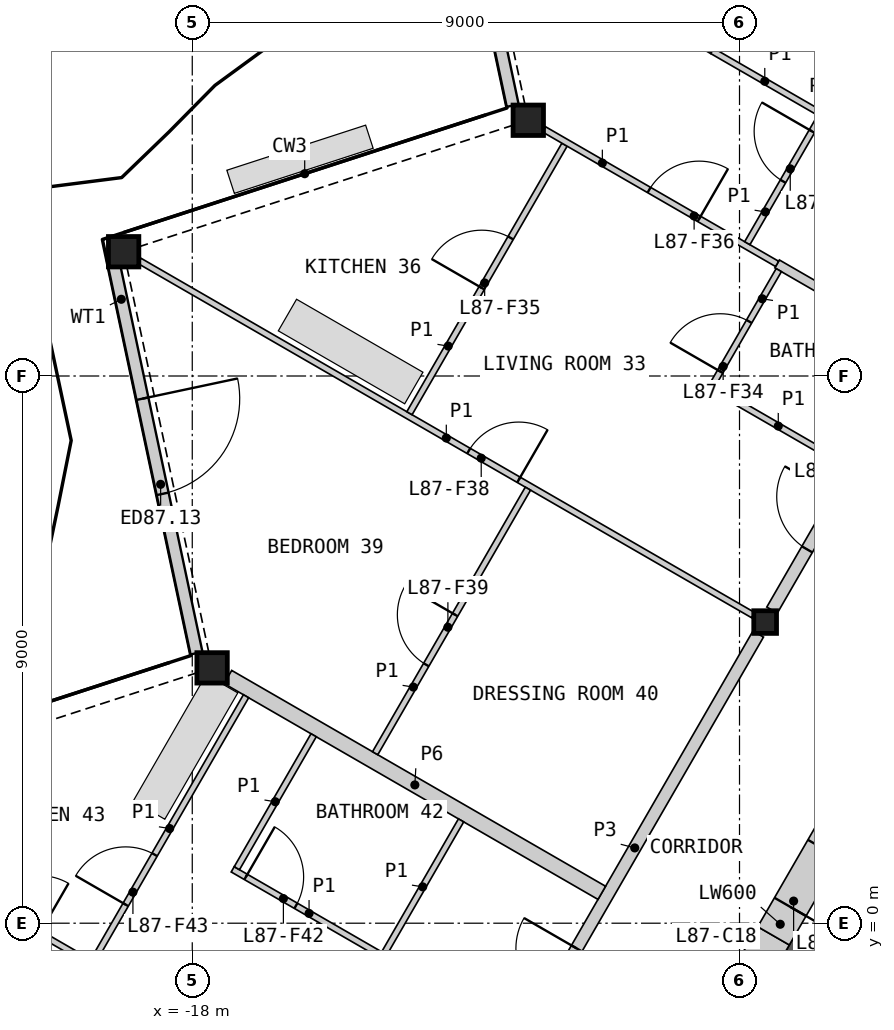
"""IFC4 building model, lengths in metres.
Left out: names, types, materials, properties, quantities, classifications, styles, units other than length and angle.
Written with IfcOpenShell. Run it as: python <this file> out.ifc"""

import sys

from ifc_helpers import new_model, si_unit, direction, frame, frame_2d, origin, origin_2d, place, context, subcontext, project, spatial, polyline, rectangle, hollow_rectangle, i_section, outline, extrude, element, fill, save


model = new_model("IFC4")
c1 = context("Model", 3, precision=1e-05, world=origin(), true_north=direction((0.0, 1.0)))
c2 = subcontext(c1, "Body", "Model", "MODEL_VIEW")
j1 = project(units=[si_unit("LENGTHUNIT", "METRE"), si_unit("PLANEANGLEUNIT", "RADIAN")], contexts=[c1])
p1 = place(None, origin())
s1 = spatial("IfcSite", under=j1, at=p1, CompositionType="ELEMENT")
p2 = place(p1, origin())
s2 = spatial("IfcBuilding", under=s1, at=p2, CompositionType="ELEMENT")
p3 = place(p2, frame((0.0, 0.0, 384.8)))
s3 = spatial("IfcBuildingStorey", under=s2, at=p3, CompositionType="ELEMENT", Elevation=384.8)
for number, where, z_axis, x_axis in (
    (1, (-12.474, 13.206, 0.0), (0.0, 0.0, 1.0), (1.0, 0.0, 0.0)),
    (2, (-19.129, 11.044, 0.0), (0.0, 0.0, 1.0), (1.0, 0.0, 0.0)),
    (3, (-17.674, 4.199, 0.0), (0.0, 0.0, 1.0), (1.0, 0.0, 0.0)),
):
    element("IfcColumn", number, at=place(p3, frame(where, z_axis=z_axis, x_axis=x_axis)), inside=s3, PredefinedType="COLUMN", context=c2, shape_type="SweptSolid", body=[
        extrude(hollow_rectangle(XDim=0.5, YDim=0.5, WallThickness=0.03, at=origin_2d()), origin(), (0.0, 0.0, 1.0), 3.4),
    ])
p4 = place(p3, frame((-8.578, 4.953, 0.0), z_axis=(0.0, 0.0, 1.0), x_axis=(1.0, 0.0, 0.0)))
e4 = element("IfcColumn", 4, at=p4, inside=s3, PredefinedType="COLUMN", context=c2, shape_type="SweptSolid", body=[
    extrude(i_section(OverallWidth=0.374, OverallDepth=0.372, WebThickness=0.016, FlangeThickness=0.026, at=origin_2d()), origin(), (0.0, 0.0, 1.0), 3.4),
])
p5 = place(p3, frame((-14.104, 19.915, 0.0), z_axis=(0.0, 0.0, 1.0), x_axis=(0.207924998532, -0.978144771997, 0.0)))
e5 = element("IfcWall", 5, at=p5, inside=s3, PredefinedType="SOLIDWALL", context=c2, shape_type="SweptSolid", body=[
    extrude(rectangle(XDim=6.612, YDim=0.2, at=frame_2d((3.306, 0.0))), origin(), (0.0, 0.0, 1.0), 2.634),
])
p6 = place(p5, frame((2.333, 0.0, 0.0)))
e6 = element("IfcOpeningElement", 6, at=p6, cuts=e5, PredefinedType="OPENING", context=c2, shape_type="SweptSolid", body=[
    extrude(rectangle(XDim=1.6, YDim=2.25, at=frame_2d((0.8, 1.125))), frame((0.0, 0.11, 0.0), z_axis=(0.0, -1.0, 0.0), x_axis=(1.0, 0.0, 0.0)), (0.0, 0.0, 1.0), 0.22),
])
p7 = place(p3, frame((-19.304, 10.909, 0.0), z_axis=(0.0, 0.0, 1.0), x_axis=(0.207882161022, -0.97815387702, 0.0)))
e7 = element("IfcWall", 7, at=p7, inside=s3, PredefinedType="SOLIDWALL", context=c2, shape_type="SweptSolid", body=[
    extrude(rectangle(XDim=6.612, YDim=0.2, at=frame_2d((3.306, 0.0))), origin(), (0.0, 0.0, 1.0), 2.634),
])
p8 = place(p7, frame((2.333, 0.0, 0.0)))
e8 = element("IfcOpeningElement", 8, at=p8, cuts=e7, PredefinedType="OPENING", context=c2, shape_type="SweptSolid", body=[
    extrude(rectangle(XDim=1.6, YDim=2.25, at=frame_2d((0.8, 1.125))), frame((0.0, 0.11, 0.0), z_axis=(0.0, -1.0, 0.0), x_axis=(1.0, 0.0, 0.0)), (0.0, 0.0, 1.0), 0.22),
])
p9 = place(p3, origin())
e9 = element("IfcWall", 9, at=p9, inside=s3, PredefinedType="SHEAR", context=c2, shape_type="SweptSolid", body=[
    extrude(outline(polyline([(-6.061, -1.697), (-8.231, -0.444), (-8.131, -0.271), (-5.96, -1.524), (-6.061, -1.697)])), origin(), (0.0, 0.0, 1.0), 3.1),
])
p10 = place(p3, frame((-8.44, -0.208, 0.0), z_axis=(0.0, 0.0, 1.0), x_axis=(-0.500001951578, -0.866024277037, 0.0)))
e10 = element("IfcWall", 10, at=p10, inside=s3, PredefinedType="SHEAR", context=c2, shape_type="SweptSolid", body=[
    extrude(rectangle(XDim=2.243, YDim=0.6, at=frame_2d((1.122, 0.0))), origin(), (0.0, 0.0, 1.0), 3.1),
])
p11 = place(p10, frame((0.7, 0.0, 0.0)))
e11 = element("IfcOpeningElement", 11, at=p11, cuts=e10, PredefinedType="OPENING", context=c2, shape_type="SweptSolid", body=[
    extrude(rectangle(XDim=1.0, YDim=2.1, at=frame_2d((0.5, 1.05))), frame((0.0, 0.31, 0.0), z_axis=(0.0, -1.0, 0.0), x_axis=(1.0, 0.0, 0.0)), (0.0, 0.0, 1.0), 0.62),
])
p12 = place(p3, frame((-7.34, 1.698, 0.0), z_axis=(0.0, 0.0, 1.0), x_axis=(-0.50002983664, -0.866008176907, 0.0)))
e12 = element("IfcWall", 12, at=p12, inside=s3, PredefinedType="SHEAR", context=c2, shape_type="SweptSolid", body=[
    extrude(rectangle(XDim=2.2, YDim=0.6, at=frame_2d((1.1, 0.0))), origin(), (0.0, 0.0, 1.0), 3.1),
])
p13 = place(p12, frame((0.55, 0.0, 0.0)))
e13 = element("IfcOpeningElement", 13, at=p13, cuts=e12, PredefinedType="OPENING", context=c2, shape_type="SweptSolid", body=[
    extrude(rectangle(XDim=1.1, YDim=2.1, at=frame_2d((0.55, 1.05))), frame((0.0, 0.31, 0.0), z_axis=(0.0, -1.0, 0.0), x_axis=(1.0, 0.0, 0.0)), (0.0, 0.0, 1.0), 0.62),
])
p14 = place(p3, frame((-8.465, 5.15, 0.0), z_axis=(0.0, 0.0, 1.0), x_axis=(0.499992155518, 0.866029932751, 0.0)))
e14 = element("IfcWall", 14, at=p14, inside=s3, PredefinedType="PARTITIONING", context=c2, shape_type="SweptSolid", body=[
    extrude(rectangle(XDim=8.123, YDim=0.2, at=frame_2d((4.062, 0.0))), origin(), (0.0, 0.0, 1.0), 3.1),
])
p15 = place(p14, frame((1.153, 0.0, 0.0)))
e15 = element("IfcOpeningElement", 15, at=p15, cuts=e14, PredefinedType="OPENING", context=c2, shape_type="SweptSolid", body=[
    extrude(rectangle(XDim=1.0, YDim=2.1, at=frame_2d((0.5, 1.05))), frame((0.0, 0.11, 0.0), z_axis=(0.0, -1.0, 0.0), x_axis=(1.0, 0.0, 0.0)), (0.0, 0.0, 1.0), 0.22),
])
p16 = place(p3, frame((-12.754, -2.279, 0.0), z_axis=(0.0, 0.0, 1.0), x_axis=(0.500001682468, 0.866024432409, 0.0)))
e16 = element("IfcWall", 16, at=p16, inside=s3, PredefinedType="PARTITIONING", context=c2, shape_type="SweptSolid", body=[
    extrude(rectangle(XDim=8.124, YDim=0.2, at=frame_2d((4.062, 0.0))), origin(), (0.0, 0.0, 1.0), 3.1),
])
p17 = place(p16, frame((1.153, 0.0, 0.0)))
e17 = element("IfcOpeningElement", 17, at=p17, cuts=e16, PredefinedType="OPENING", context=c2, shape_type="SweptSolid", body=[
    extrude(rectangle(XDim=1.0, YDim=2.1, at=frame_2d((0.5, 1.05))), frame((0.0, 0.11, 0.0), z_axis=(0.0, -1.0, 0.0), x_axis=(1.0, 0.0, 0.0)), (0.0, 0.0, 1.0), 0.22),
])
p18 = place(p3, frame((-17.414, 4.049, 0.0), z_axis=(0.0, 0.0, 1.0), x_axis=(0.866033839264, -0.499985389037, 0.0)))
e18 = element("IfcWall", 18, at=p18, inside=s3, PredefinedType="PARTITIONING", context=c2, shape_type="SweptSolid", body=[
    extrude(rectangle(XDim=7.1, YDim=0.25, at=frame_2d((3.55, 0.0))), origin(), (0.0, 0.0, 1.0), 2.33),
])
p19 = place(p3, frame((-8.382, 10.844, 0.0), z_axis=(0.0, 0.0, 1.0), x_axis=(0.866021425885, -0.500006889861, 0.0)))
e19 = element("IfcWall", 19, at=p19, inside=s3, PredefinedType="PLUMBINGWALL", context=c2, shape_type="SweptSolid", body=[
    extrude(rectangle(XDim=2.675, YDim=0.15, at=frame_2d((1.337, 0.0))), origin(), (0.0, 0.0, 1.0), 2.33),
])
p20 = place(p3, frame((-24.069, 1.887, 0.0), z_axis=(0.0, 0.0, 1.0), x_axis=(0.866023404247, -0.500003463284, 0.0)))
e20 = element("IfcWall", 20, at=p20, inside=s3, PredefinedType="PARTITIONING", context=c2, shape_type="SweptSolid", body=[
    extrude(rectangle(XDim=11.782, YDim=0.1, at=frame_2d((5.891, 0.0))), origin(), (0.0, 0.0, 1.0), 2.33),
])
p21 = place(p20, frame((3.159, 0.0, 0.0)))
e21 = element("IfcOpeningElement", 21, at=p21, cuts=e20, PredefinedType="OPENING", context=c2, shape_type="SweptSolid", body=[
    extrude(rectangle(XDim=0.95, YDim=2.1, at=frame_2d((0.475, 1.05))), frame((0.0, 0.06, 0.0), z_axis=(0.0, -1.0, 0.0), x_axis=(1.0, 0.0, 0.0)), (0.0, 0.0, 1.0), 0.12),
])
p22 = place(p3, frame((-18.869, 10.894, 0.0), z_axis=(0.0, 0.0, 1.0), x_axis=(0.866023724155, -0.500002909193, 0.0)))
e22 = element("IfcWall", 22, at=p22, inside=s3, PredefinedType="PARTITIONING", context=c2, shape_type="SweptSolid", body=[
    extrude(rectangle(XDim=11.655, YDim=0.1, at=frame_2d((5.827, 0.0))), origin(), (0.0, 0.0, 1.0), 2.33),
])
p23 = place(p22, frame((6.253, 0.0, 0.0)))
e23 = element("IfcOpeningElement", 23, at=p23, cuts=e22, PredefinedType="OPENING", context=c2, shape_type="SweptSolid", body=[
    extrude(rectangle(XDim=0.95, YDim=2.1, at=frame_2d((0.475, 1.05))), frame((0.0, 0.06, 0.0), z_axis=(0.0, -1.0, 0.0), x_axis=(1.0, 0.0, 0.0)), (0.0, 0.0, 1.0), 0.12),
])
p24 = place(p3, frame((-9.517, 14.328, 0.0), z_axis=(0.0, 0.0, 1.0), x_axis=(0.499996545922, 0.866027397988, 0.0)))
e24 = element("IfcWall", 24, at=p24, inside=s3, PredefinedType="PARTITIONING", context=c2, shape_type="SweptSolid", body=[
    extrude(rectangle(XDim=5.5, YDim=0.1, at=frame_2d((2.75, 0.0))), origin(), (0.0, 0.0, 1.0), 2.33),
])
p25 = place(p24, frame((4.3, 0.0, 0.0)))
e25 = element("IfcOpeningElement", 25, at=p25, cuts=e24, PredefinedType="OPENING", context=c2, shape_type="SweptSolid", body=[
    extrude(rectangle(XDim=0.95, YDim=2.1, at=frame_2d((0.475, 1.05))), frame((0.0, 0.06, 0.0), z_axis=(0.0, -1.0, 0.0), x_axis=(1.0, 0.0, 0.0)), (0.0, 0.0, 1.0), 0.12),
])
p26 = place(p24, frame((0.25, 0.0, 0.0)))
e26 = element("IfcOpeningElement", 26, at=p26, cuts=e24, PredefinedType="OPENING", context=c2, shape_type="SweptSolid", body=[
    extrude(rectangle(XDim=0.95, YDim=2.1, at=frame_2d((0.475, 1.05))), frame((0.0, 0.06, 0.0), z_axis=(0.0, -1.0, 0.0), x_axis=(1.0, 0.0, 0.0)), (0.0, 0.0, 1.0), 0.12),
])
p27 = place(p3, frame((-19.628, -0.619, 0.0), z_axis=(0.0, 0.0, 1.0), x_axis=(0.499990214365, 0.86603105345, 0.0)))
e27 = element("IfcWall", 27, at=p27, inside=s3, PredefinedType="PARTITIONING", context=c2, shape_type="SweptSolid", body=[
    extrude(rectangle(XDim=5.025, YDim=0.1, at=frame_2d((2.512, 0.0))), origin(), (0.0, 0.0, 1.0), 2.33),
])
p28 = place(p27, frame((1.067, 0.0, 0.0)))
e28 = element("IfcOpeningElement", 28, at=p28, cuts=e27, PredefinedType="OPENING", context=c2, shape_type="SweptSolid", body=[
    extrude(rectangle(XDim=0.95, YDim=2.1, at=frame_2d((0.475, 1.05))), frame((0.0, 0.06, 0.0), z_axis=(0.0, -1.0, 0.0), x_axis=(1.0, 0.0, 0.0)), (0.0, 0.0, 1.0), 0.12),
])
p29 = place(p3, frame((-14.992, 2.796, 0.0), z_axis=(0.0, 0.0, 1.0), x_axis=(0.499990214365, 0.86603105345, 0.0)))
e29 = element("IfcWall", 29, at=p29, inside=s3, PredefinedType="PARTITIONING", context=c2, shape_type="SweptSolid", body=[
    extrude(rectangle(XDim=5.025, YDim=0.1, at=frame_2d((2.512, 0.0))), origin(), (0.0, 0.0, 1.0), 2.33),
])
p30 = place(p29, frame((1.68, 0.0, 0.0)))
e30 = element("IfcOpeningElement", 30, at=p30, cuts=e29, PredefinedType="OPENING", context=c2, shape_type="SweptSolid", body=[
    extrude(rectangle(XDim=0.95, YDim=2.1, at=frame_2d((0.475, 1.05))), frame((0.0, 0.06, 0.0), z_axis=(0.0, -1.0, 0.0), x_axis=(1.0, 0.0, 0.0)), (0.0, 0.0, 1.0), 0.12),
])
p31 = place(p3, frame((-14.428, 8.388, 0.0), z_axis=(0.0, 0.0, 1.0), x_axis=(0.500005610874, 0.86602216432, 0.0)))
e31 = element("IfcWall", 31, at=p31, inside=s3, PredefinedType="PARTITIONING", context=c2, shape_type="SweptSolid", body=[
    extrude(rectangle(XDim=5.1, YDim=0.1, at=frame_2d((2.55, 0.0))), origin(), (0.0, 0.0, 1.0), 2.33),
])
p32 = place(p31, frame((2.379, 0.0, 0.0)))
e32 = element("IfcOpeningElement", 32, at=p32, cuts=e31, PredefinedType="OPENING", context=c2, shape_type="SweptSolid", body=[
    extrude(rectangle(XDim=0.95, YDim=2.1, at=frame_2d((0.475, 1.05))), frame((0.0, 0.06, 0.0), z_axis=(0.0, -1.0, 0.0), x_axis=(1.0, 0.0, 0.0)), (0.0, 0.0, 1.0), 0.12),
])
p33 = place(p3, frame((-12.214, 13.056, 0.0), z_axis=(0.0, 0.0, 1.0), x_axis=(0.866017452598, -0.500013771606, 0.0)))
e33 = element("IfcWall", 33, at=p33, inside=s3, PredefinedType="PARTITIONING", context=c2, shape_type="SweptSolid", body=[
    extrude(rectangle(XDim=4.425, YDim=0.1, at=frame_2d((2.213, 0.0))), origin(), (0.0, 0.0, 1.0), 2.33),
])
p34 = place(p33, frame((1.994, 0.0, 0.0)))
e34 = element("IfcOpeningElement", 34, at=p34, cuts=e33, PredefinedType="OPENING", context=c2, shape_type="SweptSolid", body=[
    extrude(rectangle(XDim=0.95, YDim=2.1, at=frame_2d((0.475, 1.05))), frame((0.0, 0.06, 0.0), z_axis=(0.0, -1.0, 0.0), x_axis=(1.0, 0.0, 0.0)), (0.0, 0.0, 1.0), 0.12),
])
p35 = place(p3, frame((-17.335, 0.886, 0.0), z_axis=(0.0, 0.0, 1.0), x_axis=(0.866032775405, -0.499987231761, 0.0)))
e35 = element("IfcWall", 35, at=p35, inside=s3, PredefinedType="PARTITIONING", context=c2, shape_type="SweptSolid", body=[
    extrude(rectangle(XDim=2.9, YDim=0.1, at=frame_2d((1.45, 0.0))), origin(), (0.0, 0.0, 1.0), 2.33),
])
p36 = place(p35, frame((0.25, 0.0, 0.0)))
e36 = element("IfcOpeningElement", 36, at=p36, cuts=e35, PredefinedType="OPENING", context=c2, shape_type="SweptSolid", body=[
    extrude(rectangle(XDim=0.95, YDim=2.1, at=frame_2d((0.475, 1.05))), frame((0.0, 0.06, 0.0), z_axis=(0.0, -1.0, 0.0), x_axis=(1.0, 0.0, 0.0)), (0.0, 0.0, 1.0), 0.12),
])
p37 = place(p3, frame((-9.51, 8.839, 0.0), z_axis=(0.0, 0.0, 1.0), x_axis=(0.866029095148, -0.499993606316, 0.0)))
e37 = element("IfcWall", 37, at=p37, inside=s3, PredefinedType="PARTITIONING", context=c2, shape_type="SweptSolid", body=[
    extrude(rectangle(XDim=2.65, YDim=0.1, at=frame_2d((1.325, 0.0))), origin(), (0.0, 0.0, 1.0), 2.33),
])
p38 = place(p3, frame((-17.267, 0.905, 0.0), z_axis=(0.0, 0.0, 1.0), x_axis=(0.499976333282, 0.866039067339, 0.0)))
e38 = element("IfcWall", 38, at=p38, inside=s3, PredefinedType="PARTITIONING", context=c2, shape_type="SweptSolid", body=[
    extrude(rectangle(XDim=2.525, YDim=0.1, at=frame_2d((1.262, 0.0))), origin(), (0.0, 0.0, 1.0), 2.33),
])
p39 = place(p3, frame((-14.842, -0.496, 0.0), z_axis=(0.0, 0.0, 1.0), x_axis=(0.500048846702, 0.865997200291, 0.0)))
e39 = element("IfcWall", 39, at=p39, inside=s3, PredefinedType="PARTITIONING", context=c2, shape_type="SweptSolid", body=[
    extrude(rectangle(XDim=2.525, YDim=0.1, at=frame_2d((1.263, 0.0))), origin(), (0.0, 0.0, 1.0), 2.33),
])
p40 = place(p3, frame((-8.872, 11.184, 0.0), z_axis=(0.0, 0.0, 1.0), x_axis=(0.499986429846, 0.866033238375, 0.0)))
e40 = element("IfcWall", 40, at=p40, inside=s3, PredefinedType="PARTITIONING", context=c2, shape_type="SweptSolid", body=[
    extrude(rectangle(XDim=2.375, YDim=0.1, at=frame_2d((1.188, 0.0))), origin(), (0.0, 0.0, 1.0), 2.33),
])
p41 = place(p40, frame((1.175, 0.0, 0.0)))
e41 = element("IfcOpeningElement", 41, at=p41, cuts=e40, PredefinedType="OPENING", context=c2, shape_type="SweptSolid", body=[
    extrude(rectangle(XDim=0.95, YDim=2.1, at=frame_2d((0.475, 1.05))), frame((0.0, 0.06, 0.0), z_axis=(0.0, -1.0, 0.0), x_axis=(1.0, 0.0, 0.0)), (0.0, 0.0, 1.0), 0.12),
])
p42 = place(p3, frame((-9.442, 8.858, 0.0), z_axis=(0.0, 0.0, 1.0), x_axis=(0.499978335414, 0.866037911478, 0.0)))
e42 = element("IfcWall", 42, at=p42, inside=s3, PredefinedType="PARTITIONING", context=c2, shape_type="SweptSolid", body=[
    extrude(rectangle(XDim=2.175, YDim=0.1, at=frame_2d((1.087, 0.0))), origin(), (0.0, 0.0, 1.0), 2.33),
])
p43 = place(p42, frame((0.25, 0.0, 0.0)))
e43 = element("IfcOpeningElement", 43, at=p43, cuts=e42, PredefinedType="OPENING", context=c2, shape_type="SweptSolid", body=[
    extrude(rectangle(XDim=0.95, YDim=2.1, at=frame_2d((0.475, 1.05))), frame((0.0, 0.06, 0.0), z_axis=(0.0, -1.0, 0.0), x_axis=(1.0, 0.0, 0.0)), (0.0, 0.0, 1.0), 0.12),
])
p44 = place(p3, frame((-9.448, 14.346, 0.0), z_axis=(0.0, 0.0, 1.0), x_axis=(0.866020521143, -0.500008456887, 0.0)))
e44 = element("IfcWall", 44, at=p44, inside=s3, PredefinedType="PARTITIONING", context=c2, shape_type="SweptSolid", body=[
    extrude(rectangle(XDim=1.995, YDim=0.1, at=frame_2d((0.998, 0.0))), origin(), (0.0, 0.0, 1.0), 2.33),
])
p45 = place(p8, origin())
e45 = element("IfcDoor", 45, at=p45, inside=s3, OperationType="DOUBLE_DOOR_SINGLE_SWING", PredefinedType="DOOR", context=c2, shape_type="SweptSolid", body=[
    extrude(rectangle(XDim=1.6, YDim=2.25, at=frame_2d((0.8, 1.125))), frame((0.0, 0.025, 0.0), z_axis=(0.0, -1.0, 0.0), x_axis=(1.0, 0.0, 0.0)), (0.0, 0.0, 1.0), 0.05),
])
fill(e8, e45)
p46 = place(p13, origin())
e46 = element("IfcDoor", 46, at=p46, inside=s3, OperationType="SINGLE_SWING_RIGHT", PredefinedType="DOOR", context=c2, shape_type="SweptSolid", body=[
    extrude(rectangle(XDim=1.1, YDim=2.1, at=frame_2d((0.55, 1.05))), frame((0.0, 0.055, 0.0), z_axis=(0.0, -1.0, 0.0), x_axis=(1.0, 0.0, 0.0)), (0.0, 0.0, 1.0), 0.05),
])
fill(e13, e46)
p47 = place(p15, origin())
e47 = element("IfcDoor", 47, at=p47, inside=s3, OperationType="SINGLE_SWING_RIGHT", PredefinedType="DOOR", context=c2, shape_type="SweptSolid", body=[
    extrude(rectangle(XDim=1.0, YDim=2.1, at=frame_2d((0.5, 1.05))), frame((0.0, 0.025, 0.0), z_axis=(0.0, -1.0, 0.0), x_axis=(1.0, 0.0, 0.0)), (0.0, 0.0, 1.0), 0.05),
])
fill(e15, e47)
p48 = place(p43, origin())
e48 = element("IfcDoor", 48, at=p48, inside=s3, OperationType="SINGLE_SWING_LEFT", PredefinedType="DOOR", context=c2, shape_type="SweptSolid", body=[
    extrude(rectangle(XDim=0.95, YDim=2.1, at=frame_2d((0.475, 1.05))), frame((0.0, 0.025, 0.0), z_axis=(0.0, -1.0, 0.0), x_axis=(1.0, 0.0, 0.0)), (0.0, 0.0, 1.0), 0.05),
])
fill(e43, e48)
p49 = place(p32, origin())
e49 = element("IfcDoor", 49, at=p49, inside=s3, OperationType="SINGLE_SWING_LEFT", PredefinedType="DOOR", context=c2, shape_type="SweptSolid", body=[
    extrude(rectangle(XDim=0.95, YDim=2.1, at=frame_2d((0.475, 1.05))), frame((0.0, 0.025, 0.0), z_axis=(0.0, -1.0, 0.0), x_axis=(1.0, 0.0, 0.0)), (0.0, 0.0, 1.0), 0.05),
])
fill(e32, e49)
p50 = place(p34, origin())
e50 = element("IfcDoor", 50, at=p50, inside=s3, OperationType="SINGLE_SWING_RIGHT", PredefinedType="DOOR", context=c2, shape_type="SweptSolid", body=[
    extrude(rectangle(XDim=0.95, YDim=2.1, at=frame_2d((0.475, 1.05))), frame((0.0, 0.025, 0.0), z_axis=(0.0, -1.0, 0.0), x_axis=(1.0, 0.0, 0.0)), (0.0, 0.0, 1.0), 0.05),
])
fill(e34, e50)
p51 = place(p41, origin())
e51 = element("IfcDoor", 51, at=p51, inside=s3, OperationType="SINGLE_SWING_RIGHT", PredefinedType="DOOR", context=c2, shape_type="SweptSolid", body=[
    extrude(rectangle(XDim=0.95, YDim=2.1, at=frame_2d((0.475, 1.05))), frame((0.0, 0.025, 0.0), z_axis=(0.0, -1.0, 0.0), x_axis=(1.0, 0.0, 0.0)), (0.0, 0.0, 1.0), 0.05),
])
fill(e41, e51)
p52 = place(p23, origin())
e52 = element("IfcDoor", 52, at=p52, inside=s3, OperationType="SINGLE_SWING_RIGHT", PredefinedType="DOOR", context=c2, shape_type="SweptSolid", body=[
    extrude(rectangle(XDim=0.95, YDim=2.1, at=frame_2d((0.475, 1.05))), frame((0.0, 0.025, 0.0), z_axis=(0.0, -1.0, 0.0), x_axis=(1.0, 0.0, 0.0)), (0.0, 0.0, 1.0), 0.05),
])
fill(e23, e52)
p53 = place(p30, origin())
e53 = element("IfcDoor", 53, at=p53, inside=s3, OperationType="SINGLE_SWING_RIGHT", PredefinedType="DOOR", context=c2, shape_type="SweptSolid", body=[
    extrude(rectangle(XDim=0.95, YDim=2.1, at=frame_2d((0.475, 1.05))), frame((0.0, 0.025, 0.0), z_axis=(0.0, -1.0, 0.0), x_axis=(1.0, 0.0, 0.0)), (0.0, 0.0, 1.0), 0.05),
])
fill(e30, e53)
p54 = place(p17, origin())
e54 = element("IfcDoor", 54, at=p54, inside=s3, OperationType="SINGLE_SWING_RIGHT", PredefinedType="DOOR", context=c2, shape_type="SweptSolid", body=[
    extrude(rectangle(XDim=1.0, YDim=2.1, at=frame_2d((0.5, 1.05))), frame((0.0, 0.025, 0.0), z_axis=(0.0, -1.0, 0.0), x_axis=(1.0, 0.0, 0.0)), (0.0, 0.0, 1.0), 0.05),
])
fill(e17, e54)
p55 = place(p36, origin())
e55 = element("IfcDoor", 55, at=p55, inside=s3, OperationType="SINGLE_SWING_LEFT", PredefinedType="DOOR", context=c2, shape_type="SweptSolid", body=[
    extrude(rectangle(XDim=0.95, YDim=2.1, at=frame_2d((0.475, 1.05))), frame((0.0, 0.025, 0.0), z_axis=(0.0, -1.0, 0.0), x_axis=(1.0, 0.0, 0.0)), (0.0, 0.0, 1.0), 0.05),
])
fill(e36, e55)
p56 = place(p28, origin())
e56 = element("IfcDoor", 56, at=p56, inside=s3, OperationType="SINGLE_SWING_LEFT", PredefinedType="DOOR", context=c2, shape_type="SweptSolid", body=[
    extrude(rectangle(XDim=0.95, YDim=2.1, at=frame_2d((0.475, 1.05))), frame((0.0, 0.025, 0.0), z_axis=(0.0, -1.0, 0.0), x_axis=(1.0, 0.0, 0.0)), (0.0, 0.0, 1.0), 0.05),
])
fill(e28, e56)
save(model, sys.argv[1])
